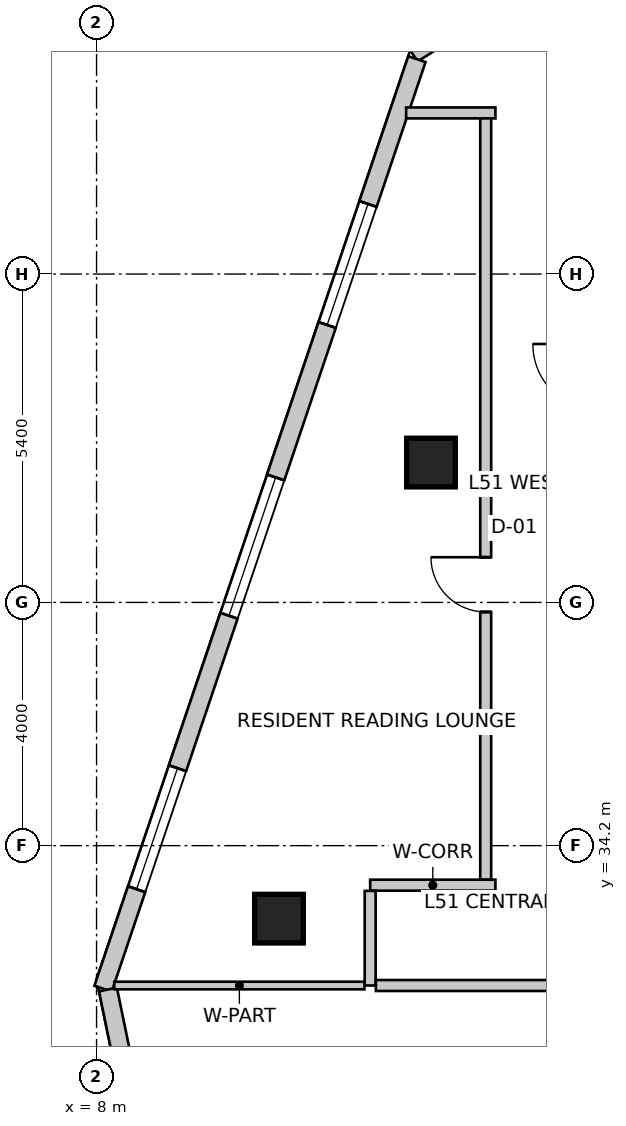
"""IFC4 building model, lengths in metres.
Left out: names, types, materials, properties, quantities, classifications, styles, units other than length and angle.
Written with IfcOpenShell. Run it as: python <this file> out.ifc"""

import sys

from ifc_helpers import new_model, si_unit, direction, frame, frame_2d, origin, origin_2d, place, context, subcontext, project, spatial, rectangle, extrude, source, transform, mapped, element, fill, save


model = new_model("IFC4")
c1 = context("Model", 3, precision=1e-05, world=origin(), true_north=direction((0.0, 1.0)))
c2 = subcontext(c1, "Body", "Model", "MODEL_VIEW")
j1 = project(units=[si_unit("LENGTHUNIT", "METRE"), si_unit("PLANEANGLEUNIT", "RADIAN")], contexts=[c1])
p1 = place(None, origin())
s1 = spatial("IfcSite", under=j1, at=p1, CompositionType="ELEMENT")
p2 = place(p1, origin())
s2 = spatial("IfcBuilding", under=s1, at=p2, CompositionType="ELEMENT")
p3 = place(p2, frame((0.0, 0.0, 204.4)))
s3 = spatial("IfcBuildingStorey", under=s2, at=p3, CompositionType="ELEMENT", Elevation=204.4)
m1 = source(origin(), c2, "Body", "SweptSolid", [
    extrude(rectangle(XDim=0.8, YDim=0.8, at=origin_2d()), origin(), (0.0, 0.0, 1.0), 3.5),
])
for number, where, z_axis, x_axis in (
    (1, (11.0, 33.0, 0.0), (0.0, 0.0, 1.0), (1.0, 0.0, 0.0)),
    (2, (13.5, 40.5, 0.0), (0.0, 0.0, 1.0), (1.0, 0.0, 0.0)),
):
    element("IfcColumn", number, at=place(p3, frame(where, z_axis=z_axis, x_axis=x_axis)), inside=s3, PredefinedType="COLUMN", context=c2, shape_type="MappedRepresentation", body=[
        mapped(m1, transform((0.0, 0.0, 0.0), scale=1.0)),
    ])
p4 = place(p3, frame((21.875, 52.742, 0.0), z_axis=(0.0, 0.0, 1.0), x_axis=(-0.843666375448, -0.536867811419, 0.0)))
e3 = element("IfcWall", 3, at=p4, inside=s3, PredefinedType="SOLIDWALL", context=c2, shape_type="SweptSolid", body=[
    extrude(rectangle(XDim=10.284, YDim=0.3, at=frame_2d((5.142, 0.0))), origin(), (0.0, 0.0, 1.0), 3.25),
])
m2 = source(origin(), c2, "Body", "SweptSolid", [
    extrude(rectangle(XDim=2.4, YDim=2.2, at=frame_2d((1.2, 1.1))), frame((0.0, 0.16, 0.0), z_axis=(0.0, -1.0, 0.0), x_axis=(1.0, 0.0, 0.0)), (0.0, 0.0, 1.0), 0.32),
])
p5 = place(p4, frame((3.307, 0.0, 0.85)))
e4 = element("IfcOpeningElement", 4, at=p5, cuts=e3, PredefinedType="OPENING", context=c2, shape_type="MappedRepresentation", body=[
    mapped(m2, transform((0.0, 0.0, 0.0), scale=1.0)),
])
p6 = place(p3, frame((13.269, 47.134, 0.0), z_axis=(0.0, 0.0, 1.0), x_axis=(-0.319920776449, -0.947444297464, 0.0)))
e5 = element("IfcWall", 5, at=p6, inside=s3, PredefinedType="SOLIDWALL", context=c2, shape_type="SweptSolid", body=[
    extrude(rectangle(XDim=16.133, YDim=0.3, at=frame_2d((8.067, 0.0))), origin(), (0.0, 0.0, 1.0), 3.25),
])
m3 = source(origin(), c2, "Body", "SweptSolid", [
    extrude(rectangle(XDim=2.1, YDim=2.0, at=frame_2d((1.05, 1.0))), frame((0.0, 0.16, 0.0), z_axis=(0.0, -1.0, 0.0), x_axis=(1.0, 0.0, 0.0)), (0.0, 0.0, 1.0), 0.32),
])
p7 = place(p6, frame((2.513, 0.0, 0.85)))
e6 = element("IfcOpeningElement", 6, at=p7, cuts=e5, PredefinedType="OPENING", context=c2, shape_type="MappedRepresentation", body=[
    mapped(m3, transform((0.0, 0.0, 0.0), scale=1.0)),
])
p8 = place(p6, frame((7.26, 0.0, 0.85)))
e7 = element("IfcOpeningElement", 7, at=p8, cuts=e5, PredefinedType="OPENING", context=c2, shape_type="MappedRepresentation", body=[
    mapped(m2, transform((0.0, 0.0, 0.0), scale=1.0)),
])
p9 = place(p6, frame((12.307, 0.0, 0.85)))
e8 = element("IfcOpeningElement", 8, at=p9, cuts=e5, PredefinedType="OPENING", context=c2, shape_type="MappedRepresentation", body=[
    mapped(m3, transform((0.0, 0.0, 0.0), scale=1.0)),
])
p10 = place(p3, frame((8.188, 31.834, 0.0), z_axis=(0.0, 0.0, 1.0), x_axis=(0.202303475707, -0.979322880217, 0.0)))
e9 = element("IfcWall", 9, at=p10, inside=s3, PredefinedType="SOLIDWALL", context=c2, shape_type="SweptSolid", body=[
    extrude(rectangle(XDim=15.766, YDim=0.3, at=frame_2d((7.883, 0.0))), origin(), (0.0, 0.0, 1.0), 3.25),
])
m4 = source(origin(), c2, "Body", "SweptSolid", [
    extrude(rectangle(XDim=1.6, YDim=2.15, at=frame_2d((0.8, 1.075))), frame((0.0, 0.16, 0.0), z_axis=(0.0, -1.0, 0.0), x_axis=(1.0, 0.0, 0.0)), (0.0, 0.0, 1.0), 0.32),
])
p11 = place(p10, frame((9.466, 0.0, 0.0)))
e10 = element("IfcOpeningElement", 10, at=p11, cuts=e9, PredefinedType="OPENING", context=c2, shape_type="MappedRepresentation", body=[
    mapped(m4, transform((0.0, 0.0, 0.0), scale=1.0)),
])
p12 = place(p10, frame((1.337, 0.0, 0.85)))
e11 = element("IfcOpeningElement", 11, at=p12, cuts=e9, PredefinedType="OPENING", context=c2, shape_type="MappedRepresentation", body=[
    mapped(m2, transform((0.0, 0.0, 0.0), scale=1.0)),
])
p13 = place(p10, frame((5.92, 0.0, 0.85)))
e12 = element("IfcOpeningElement", 12, at=p13, cuts=e9, PredefinedType="OPENING", context=c2, shape_type="MappedRepresentation", body=[
    mapped(m3, transform((0.0, 0.0, 0.0), scale=1.0)),
])
p14 = place(p10, frame((11.438, 0.0, 0.85)))
e13 = element("IfcOpeningElement", 13, at=p14, cuts=e9, PredefinedType="OPENING", context=c2, shape_type="MappedRepresentation", body=[
    mapped(m2, transform((0.0, 0.0, 0.0), scale=1.0)),
])
p15 = place(p3, frame((12.5, 33.55, 0.0), z_axis=(0.0, 0.0, 1.0), x_axis=(1.0, 0.0, 0.0)))
e14 = element("IfcWall", 14, at=p15, inside=s3, PredefinedType="PARTITIONING", context=c2, shape_type="SweptSolid", body=[
    extrude(rectangle(XDim=2.06, YDim=0.18, at=frame_2d((1.03, 0.0))), origin(), (0.0, 0.0, 1.0), 3.25),
])
p16 = place(p3, frame((12.5, 31.9, 0.0), z_axis=(0.0, 0.0, 1.0), x_axis=(0.0, 1.0, 0.0)))
e15 = element("IfcWall", 15, at=p16, inside=s3, PredefinedType="PARTITIONING", context=c2, shape_type="SweptSolid", body=[
    extrude(rectangle(XDim=1.556, YDim=0.18, at=frame_2d((0.778, 0.0))), origin(), (0.0, 0.0, 1.0), 2.835),
])
p17 = place(p3, frame((29.265, 31.9, 0.0), z_axis=(0.0, 0.0, 1.0), x_axis=(-1.0, 0.0, 0.0)))
e16 = element("IfcWall", 16, at=p17, inside=s3, PredefinedType="PARTITIONING", context=c2, shape_type="SweptSolid", body=[
    extrude(rectangle(XDim=16.671, YDim=0.18, at=frame_2d((8.335, 0.0))), origin(), (0.0, 0.0, 1.0), 2.835),
])
m5 = source(origin(), c2, "Body", "SweptSolid", [
    extrude(rectangle(XDim=1.6, YDim=2.15, at=frame_2d((0.8, 1.075))), frame((0.0, 0.1, 0.0), z_axis=(0.0, -1.0, 0.0), x_axis=(1.0, 0.0, 0.0)), (0.0, 0.0, 1.0), 0.2),
])
p18 = place(p17, frame((7.536, 0.0, 0.0)))
e17 = element("IfcOpeningElement", 17, at=p18, cuts=e16, PredefinedType="OPENING", context=c2, shape_type="MappedRepresentation", body=[
    mapped(m5, transform((0.0, 0.0, 0.0), scale=1.0)),
])
p19 = place(p3, frame((14.4, 33.644, 0.0), z_axis=(0.0, 0.0, 1.0), x_axis=(0.0, 1.0, 0.0)))
e18 = element("IfcWall", 18, at=p19, inside=s3, PredefinedType="PARTITIONING", context=c2, shape_type="SweptSolid", body=[
    extrude(rectangle(XDim=12.606, YDim=0.18, at=frame_2d((6.303, 0.0))), origin(), (0.0, 0.0, 1.0), 3.25),
])
m6 = source(origin(), c2, "Body", "SweptSolid", [
    extrude(rectangle(XDim=0.9, YDim=2.15, at=frame_2d((0.45, 1.075))), frame((0.0, 0.1, 0.0), z_axis=(0.0, -1.0, 0.0), x_axis=(1.0, 0.0, 0.0)), (0.0, 0.0, 1.0), 0.2),
])
p20 = place(p19, frame((4.399, 0.0, 0.0)))
e19 = element("IfcOpeningElement", 19, at=p20, cuts=e18, PredefinedType="OPENING", context=c2, shape_type="MappedRepresentation", body=[
    mapped(m6, transform((0.0, 0.0, 0.0), scale=1.0)),
])
p21 = place(p3, frame((14.56, 46.25, 0.0), z_axis=(0.0, 0.0, 1.0), x_axis=(-1.0, 0.0, 0.0)))
e20 = element("IfcWall", 20, at=p21, inside=s3, PredefinedType="PARTITIONING", context=c2, shape_type="SweptSolid", body=[
    extrude(rectangle(XDim=1.469, YDim=0.18, at=frame_2d((0.734, 0.0))), origin(), (0.0, 0.0, 1.0), 3.25),
])
p22 = place(p3, frame((12.406, 31.9, 0.0), z_axis=(0.0, 0.0, 1.0), x_axis=(-1.0, 0.0, 0.0)))
e21 = element("IfcWall", 21, at=p22, inside=s3, PredefinedType="PARTITIONING", context=c2, shape_type="SweptSolid", body=[
    extrude(rectangle(XDim=4.115, YDim=0.125, at=frame_2d((2.057, 0.0))), origin(), (0.0, 0.0, 1.0), 2.542),
])
m7 = source(origin(), c2, "Body", "SweptSolid", [
    extrude(rectangle(XDim=2.1, YDim=2.0, at=frame_2d((1.05, 1.0))), frame((0.0, -0.015, 0.0), z_axis=(0.0, -1.0, 0.0), x_axis=(1.0, 0.0, 0.0)), (0.0, 0.0, 1.0), 0.06),
])
p23 = place(p7, origin())
e22 = element("IfcWindow", 22, at=p23, inside=s3, PartitioningType="SINGLE_PANEL", PredefinedType="WINDOW", context=c2, shape_type="MappedRepresentation", body=[
    mapped(m7, transform((0.0, 0.0, 0.0), scale=1.0)),
])
fill(e6, e22)
m8 = source(origin(), c2, "Body", "SweptSolid", [
    extrude(rectangle(XDim=2.4, YDim=2.2, at=frame_2d((1.2, 1.1))), frame((0.0, -0.015, 0.0), z_axis=(0.0, -1.0, 0.0), x_axis=(1.0, 0.0, 0.0)), (0.0, 0.0, 1.0), 0.06),
])
p24 = place(p8, origin())
e23 = element("IfcWindow", 23, at=p24, inside=s3, PartitioningType="SINGLE_PANEL", PredefinedType="WINDOW", context=c2, shape_type="MappedRepresentation", body=[
    mapped(m8, transform((0.0, 0.0, 0.0), scale=1.0)),
])
fill(e7, e23)
p25 = place(p9, origin())
e24 = element("IfcWindow", 24, at=p25, inside=s3, PartitioningType="SINGLE_PANEL", PredefinedType="WINDOW", context=c2, shape_type="MappedRepresentation", body=[
    mapped(m7, transform((0.0, 0.0, 0.0), scale=1.0)),
])
fill(e8, e24)
m9 = source(origin(), c2, "Body", "SweptSolid", [
    extrude(rectangle(XDim=0.9, YDim=2.15, at=frame_2d((0.45, 1.075))), frame((0.0, 0.025, 0.0), z_axis=(0.0, -1.0, 0.0), x_axis=(1.0, 0.0, 0.0)), (0.0, 0.0, 1.0), 0.05),
])
p26 = place(p20, origin())
e25 = element("IfcDoor", 25, at=p26, inside=s3, OperationType="SINGLE_SWING_RIGHT", PredefinedType="DOOR", context=c2, shape_type="MappedRepresentation", body=[
    mapped(m9, transform((0.0, 0.0, 0.0), scale=1.0)),
])
fill(e19, e25)
save(model, sys.argv[1])
